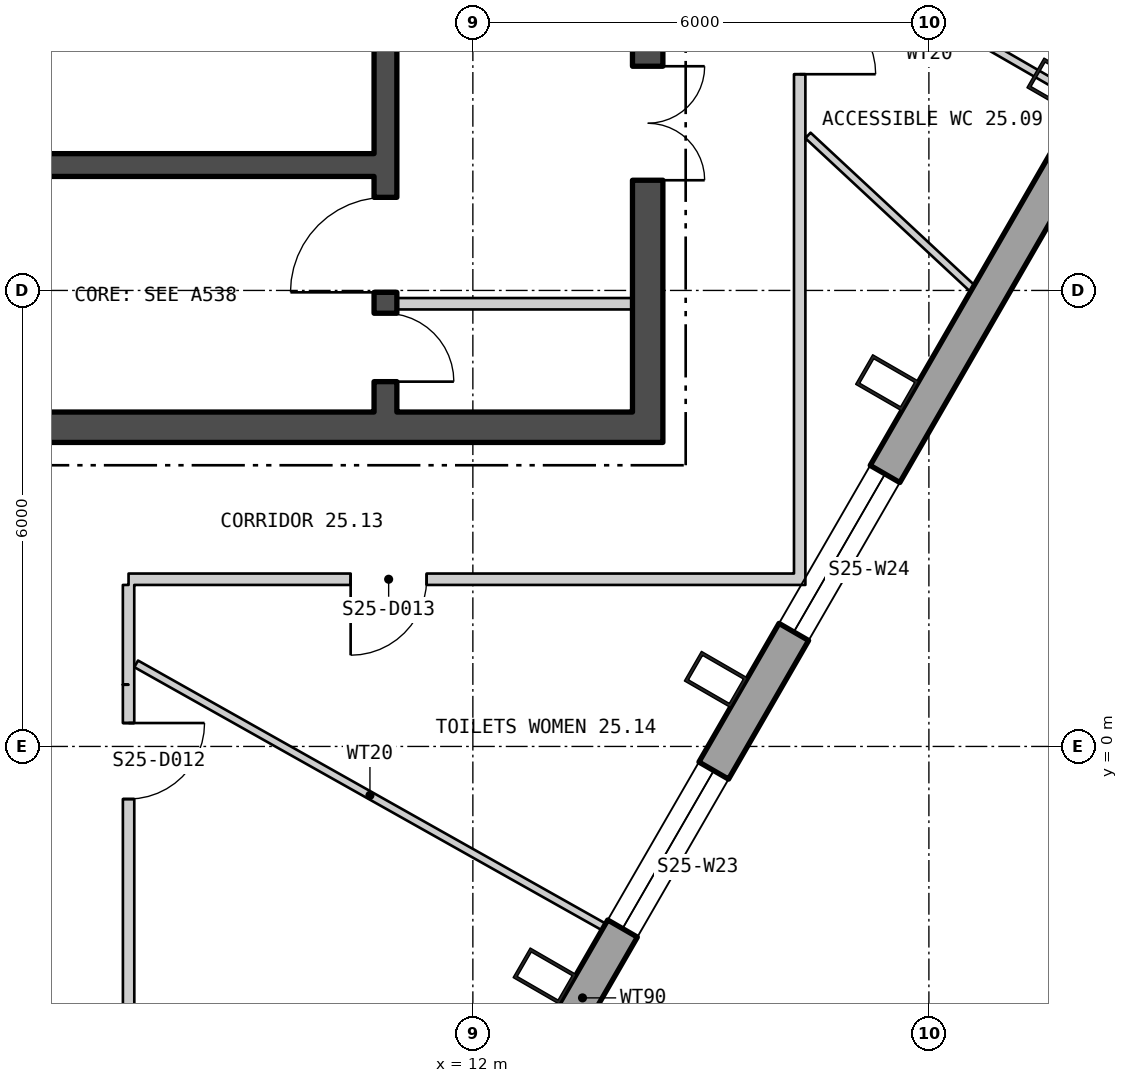
"""IFC4 building model, lengths in metres.
Left out: names, types, materials, properties, quantities, classifications, styles, units other than length and angle.
Written with IfcOpenShell. Run it as: python <this file> out.ifc"""

import sys

from ifc_helpers import new_model, si_unit, direction, frame, frame_2d, origin, origin_2d, place, context, subcontext, project, spatial, polyline, rectangle, hollow_rectangle, outline, extrude, element, fill, save


model = new_model("IFC4")
c1 = context("Model", 3, precision=1e-05, world=origin(), true_north=direction((0.0, 1.0)))
c2 = subcontext(c1, "Body", "Model", "MODEL_VIEW")
j1 = project(units=[si_unit("LENGTHUNIT", "METRE"), si_unit("PLANEANGLEUNIT", "RADIAN")], contexts=[c1])
p1 = place(None, origin())
s1 = spatial("IfcSite", under=j1, at=p1, CompositionType="ELEMENT")
p2 = place(p1, origin())
s2 = spatial("IfcBuilding", under=s1, at=p2, CompositionType="ELEMENT")
p3 = place(p2, frame((0.0, 0.0, 321.0)))
s3 = spatial("IfcBuildingStorey", under=s2, at=p3, CompositionType="ELEMENT", Elevation=321.0)
for number, where, z_axis, x_axis in (
    (1, (12.945, -3.021, 0.0), (0.0, 0.0, 1.0), (0.5, 0.866, 0.0)),
    (2, (15.198, 0.882, 0.0), (0.0, 0.0, 1.0), (0.5, 0.866, 0.0)),
    (3, (17.451, 4.785, 0.0), (0.0, 0.0, 1.0), (0.5, 0.866, 0.0)),
    (4, (19.705, 8.688, 0.0), (0.0, 0.0, 1.0), (0.5, 0.866, 0.0)),
):
    element("IfcColumn", number, at=place(p3, frame(where, z_axis=z_axis, x_axis=x_axis)), inside=s3, PredefinedType="COLUMN", context=c2, shape_type="SweptSolid", body=[
        extrude(hollow_rectangle(XDim=0.45, YDim=0.7, WallThickness=0.04, at=origin_2d()), origin(), (0.0, 0.0, 1.0), 4.2),
    ])
p4 = place(p3, frame((2.01, -23.11, -0.18), z_axis=(0.0, 0.0, 1.0), x_axis=(0.500000141277, 0.866025322218, 0.0)))
e5 = element("IfcWall", 5, at=p4, inside=s3, PredefinedType="SOLIDWALL", context=c2, shape_type="SweptSolid", body=[
    extrude(outline(polyline([(-0.13, -0.225), (45.86, -0.225), (45.6, 0.225), (0.13, 0.225), (-0.13, -0.225)])), origin(), (0.0, 0.0, 1.0), 3.98),
])
p5 = place(p4, frame((1.424, 0.0, 1.08)))
e6 = element("IfcOpeningElement", 6, at=p5, cuts=e5, PredefinedType="OPENING", context=c2, shape_type="SweptSolid", body=[
    extrude(rectangle(XDim=2.4, YDim=2.3, at=frame_2d((1.2, 1.15))), frame((0.0, 0.235, 0.0), z_axis=(0.0, -1.0, 0.0), x_axis=(1.0, 0.0, 0.0)), (0.0, 0.0, 1.0), 0.47),
])
p6 = place(p4, frame((5.892, 0.0, 1.08)))
e7 = element("IfcOpeningElement", 7, at=p6, cuts=e5, PredefinedType="OPENING", context=c2, shape_type="SweptSolid", body=[
    extrude(rectangle(XDim=2.4, YDim=2.3, at=frame_2d((1.2, 1.15))), frame((0.0, 0.235, 0.0), z_axis=(0.0, -1.0, 0.0), x_axis=(1.0, 0.0, 0.0)), (0.0, 0.0, 1.0), 0.47),
])
p7 = place(p4, frame((14.905, 0.0, 1.08)))
e8 = element("IfcOpeningElement", 8, at=p7, cuts=e5, PredefinedType="OPENING", context=c2, shape_type="SweptSolid", body=[
    extrude(rectangle(XDim=2.4, YDim=2.3, at=frame_2d((1.2, 1.15))), frame((0.0, 0.235, 0.0), z_axis=(0.0, -1.0, 0.0), x_axis=(1.0, 0.0, 0.0)), (0.0, 0.0, 1.0), 0.47),
])
p8 = place(p4, frame((19.412, 0.0, 1.08)))
e9 = element("IfcOpeningElement", 9, at=p8, cuts=e5, PredefinedType="OPENING", context=c2, shape_type="SweptSolid", body=[
    extrude(rectangle(XDim=2.4, YDim=2.3, at=frame_2d((1.2, 1.15))), frame((0.0, 0.235, 0.0), z_axis=(0.0, -1.0, 0.0), x_axis=(1.0, 0.0, 0.0)), (0.0, 0.0, 1.0), 0.47),
])
p9 = place(p4, frame((23.918, 0.0, 1.08)))
e10 = element("IfcOpeningElement", 10, at=p9, cuts=e5, PredefinedType="OPENING", context=c2, shape_type="SweptSolid", body=[
    extrude(rectangle(XDim=2.4, YDim=2.3, at=frame_2d((1.2, 1.15))), frame((0.0, 0.235, 0.0), z_axis=(0.0, -1.0, 0.0), x_axis=(1.0, 0.0, 0.0)), (0.0, 0.0, 1.0), 0.47),
])
p10 = place(p4, frame((28.425, 0.0, 1.08)))
e11 = element("IfcOpeningElement", 11, at=p10, cuts=e5, PredefinedType="OPENING", context=c2, shape_type="SweptSolid", body=[
    extrude(rectangle(XDim=2.4, YDim=2.3, at=frame_2d((1.2, 1.15))), frame((0.0, 0.235, 0.0), z_axis=(0.0, -1.0, 0.0), x_axis=(1.0, 0.0, 0.0)), (0.0, 0.0, 1.0), 0.47),
])
p11 = place(p4, frame((37.438, 0.0, 1.08)))
e12 = element("IfcOpeningElement", 12, at=p11, cuts=e5, PredefinedType="OPENING", context=c2, shape_type="SweptSolid", body=[
    extrude(rectangle(XDim=2.4, YDim=2.3, at=frame_2d((1.2, 1.15))), frame((0.0, 0.235, 0.0), z_axis=(0.0, -1.0, 0.0), x_axis=(1.0, 0.0, 0.0)), (0.0, 0.0, 1.0), 0.47),
])
p12 = place(p4, frame((41.907, 0.0, 1.08)))
e13 = element("IfcOpeningElement", 13, at=p12, cuts=e5, PredefinedType="OPENING", context=c2, shape_type="SweptSolid", body=[
    extrude(rectangle(XDim=2.4, YDim=2.3, at=frame_2d((1.2, 1.15))), frame((0.0, 0.235, 0.0), z_axis=(0.0, -1.0, 0.0), x_axis=(1.0, 0.0, 0.0)), (0.0, 0.0, 1.0), 0.47),
])
p13 = place(p3, frame((-14.5, 4.2, 0.0), z_axis=(0.0, 0.0, 1.0), x_axis=(1.0, 0.0, 0.0)))
e14 = element("IfcWall", 14, at=p13, inside=s3, PredefinedType="SHEAR", context=c2, shape_type="SweptSolid", body=[
    extrude(rectangle(XDim=29.0, YDim=0.4, at=frame_2d((14.5, 0.0))), origin(), (0.0, 0.0, 1.0), 4.0),
])
p14 = place(p13, frame((9.0, 0.0, 0.0)))
e15 = element("IfcOpeningElement", 15, at=p14, cuts=e14, PredefinedType="OPENING", context=c2, shape_type="SweptSolid", body=[
    extrude(rectangle(XDim=1.8, YDim=2.4, at=frame_2d((0.9, 1.2))), frame((0.0, 0.21, 0.0), z_axis=(0.0, -1.0, 0.0), x_axis=(1.0, 0.0, 0.0)), (0.0, 0.0, 1.0), 0.42),
])
p15 = place(p13, frame((19.0, 0.0, 0.0)))
e16 = element("IfcOpeningElement", 16, at=p15, cuts=e14, PredefinedType="OPENING", context=c2, shape_type="SweptSolid", body=[
    extrude(rectangle(XDim=1.8, YDim=2.4, at=frame_2d((0.9, 1.2))), frame((0.0, 0.21, 0.0), z_axis=(0.0, -1.0, 0.0), x_axis=(1.0, 0.0, 0.0)), (0.0, 0.0, 1.0), 0.42),
])
p16 = place(p3, frame((14.3, 4.4, 0.0), z_axis=(0.0, 0.0, 1.0), x_axis=(0.0, 1.0, 0.0)))
e17 = element("IfcWall", 17, at=p16, inside=s3, PredefinedType="SHEAR", context=c2, shape_type="SweptSolid", body=[
    extrude(rectangle(XDim=13.2, YDim=0.4, at=frame_2d((6.6, 0.0))), origin(), (0.0, 0.0, 1.0), 4.0),
])
p17 = place(p16, frame((3.05, 0.0, 0.0)))
e18 = element("IfcOpeningElement", 18, at=p17, cuts=e17, PredefinedType="OPENING", context=c2, shape_type="SweptSolid", body=[
    extrude(rectangle(XDim=1.5, YDim=2.1, at=frame_2d((0.75, 1.05))), frame((0.0, 0.21, 0.0), z_axis=(0.0, -1.0, 0.0), x_axis=(1.0, 0.0, 0.0)), (0.0, 0.0, 1.0), 0.42),
])
p18 = place(p3, frame((10.85, 4.4, 0.0), z_axis=(0.0, 0.0, 1.0), x_axis=(0.0, 1.0, 0.0)))
e19 = element("IfcWall", 19, at=p18, inside=s3, PredefinedType="SHEAR", context=c2, shape_type="SweptSolid", body=[
    extrude(rectangle(XDim=13.2, YDim=0.3, at=frame_2d((6.6, 0.0))), origin(), (0.0, 0.0, 1.0), 4.0),
])
p19 = place(p18, frame((1.575, 0.0, 0.0)))
e20 = element("IfcOpeningElement", 20, at=p19, cuts=e19, PredefinedType="OPENING", context=c2, shape_type="SweptSolid", body=[
    extrude(rectangle(XDim=1.25, YDim=2.1, at=frame_2d((0.625, 1.05))), frame((0.0, 0.16, 0.0), z_axis=(0.0, -1.0, 0.0), x_axis=(1.0, 0.0, 0.0)), (0.0, 0.0, 1.0), 0.32),
])
p20 = place(p18, frame((0.4, 0.0, 0.0)))
e21 = element("IfcOpeningElement", 21, at=p20, cuts=e19, PredefinedType="OPENING", context=c2, shape_type="SweptSolid", body=[
    extrude(rectangle(XDim=0.9, YDim=2.1, at=frame_2d((0.45, 1.05))), frame((0.0, 0.16, 0.0), z_axis=(0.0, -1.0, 0.0), x_axis=(1.0, 0.0, 0.0)), (0.0, 0.0, 1.0), 0.32),
])
p21 = place(p3, frame((2.6, 7.65, 0.0), z_axis=(0.0, 0.0, 1.0), x_axis=(1.0, 0.0, 0.0)))
e22 = element("IfcWall", 22, at=p21, inside=s3, PredefinedType="SHEAR", context=c2, shape_type="SweptSolid", body=[
    extrude(rectangle(XDim=8.1, YDim=0.3, at=frame_2d((4.05, 0.0))), origin(), (0.0, 0.0, 1.0), 4.0),
])
p22 = place(p3, frame((11.0, 5.825, 0.0), z_axis=(0.0, 0.0, 1.0), x_axis=(1.0, 0.0, 0.0)))
e23 = element("IfcWall", 23, at=p22, inside=s3, PredefinedType="PARTITIONING", context=c2, shape_type="SweptSolid", body=[
    extrude(rectangle(XDim=3.1, YDim=0.15, at=frame_2d((1.55, 0.0))), origin(), (0.0, 0.0, 1.0), 4.0),
])
p23 = place(p3, frame((7.47, 0.812, 0.0), z_axis=(0.0, 0.0, 1.0), x_axis=(0.000170502981, -0.999999985464, 0.0)))
e24 = element("IfcWall", 24, at=p23, inside=s3, PredefinedType="PARTITIONING", context=c2, shape_type="SweptSolid", body=[
    extrude(rectangle(XDim=5.865, YDim=0.15, at=frame_2d((2.933, 0.0))), origin(), (0.0, 0.0, 1.0), 4.0),
])
p24 = place(p23, frame((0.504, 0.0, 0.0)))
e25 = element("IfcOpeningElement", 25, at=p24, cuts=e24, PredefinedType="OPENING", context=c2, shape_type="SweptSolid", body=[
    extrude(rectangle(XDim=1.0, YDim=2.1, at=frame_2d((0.5, 1.05))), frame((0.0, 0.085, 0.0), z_axis=(0.0, -1.0, 0.0), x_axis=(1.0, 0.0, 0.0)), (0.0, 0.0, 1.0), 0.17),
])
p25 = place(p3, frame((7.47, 0.812, 0.0), z_axis=(0.0, 0.0, 1.0), x_axis=(0.0, 1.0, 0.0)))
e26 = element("IfcWall", 26, at=p25, inside=s3, PredefinedType="PARTITIONING", context=c2, shape_type="SweptSolid", body=[
    extrude(rectangle(XDim=1.313, YDim=0.15, at=frame_2d((0.656, 0.0))), origin(), (0.0, 0.0, 1.0), 4.0),
])
p26 = place(p3, frame((7.47, 2.2, 0.0), z_axis=(0.0, 0.0, 1.0), x_axis=(1.0, 0.0, 0.0)))
e27 = element("IfcWall", 27, at=p26, inside=s3, PredefinedType="PARTITIONING", context=c2, shape_type="SweptSolid", body=[
    extrude(rectangle(XDim=8.755, YDim=0.15, at=frame_2d((4.378, 0.0))), origin(), (0.0, 0.0, 1.0), 4.0),
])
p27 = place(p26, frame((2.922, 0.0, 0.0)))
e28 = element("IfcOpeningElement", 28, at=p27, cuts=e27, PredefinedType="OPENING", context=c2, shape_type="SweptSolid", body=[
    extrude(rectangle(XDim=1.0, YDim=2.1, at=frame_2d((0.5, 1.05))), frame((0.0, 0.085, 0.0), z_axis=(0.0, -1.0, 0.0), x_axis=(1.0, 0.0, 0.0)), (0.0, 0.0, 1.0), 0.17),
])
p28 = place(p3, frame((7.57, 1.087, 0.0), z_axis=(0.0, 0.0, 1.0), x_axis=(0.871545267987, -0.490315047546, 0.0)))
e29 = element("IfcWall", 29, at=p28, inside=s3, PredefinedType="PARTITIONING", context=c2, shape_type="SweptSolid", body=[
    extrude(rectangle(XDim=7.059, YDim=0.1, at=frame_2d((3.529, 0.0))), origin(), (0.0, 0.0, 1.0), 4.0),
])
p29 = place(p3, frame((16.3, 2.125, 0.0), z_axis=(0.0, 0.0, 1.0), x_axis=(0.0, 1.0, 0.0)))
e30 = element("IfcWall", 30, at=p29, inside=s3, PredefinedType="PARTITIONING", context=c2, shape_type="SweptSolid", body=[
    extrude(rectangle(XDim=17.623, YDim=0.15, at=frame_2d((8.812, 0.0))), origin(), (0.0, 0.0, 1.0), 4.0),
])
p30 = place(p29, frame((6.72, 0.0, 0.0)))
e31 = element("IfcOpeningElement", 31, at=p30, cuts=e30, PredefinedType="OPENING", context=c2, shape_type="SweptSolid", body=[
    extrude(rectangle(XDim=1.0, YDim=2.1, at=frame_2d((0.5, 1.05))), frame((0.0, 0.085, 0.0), z_axis=(0.0, -1.0, 0.0), x_axis=(1.0, 0.0, 0.0)), (0.0, 0.0, 1.0), 0.17),
])
p31 = place(p29, frame((9.633, 0.0, 0.0)))
e32 = element("IfcOpeningElement", 32, at=p31, cuts=e30, PredefinedType="OPENING", context=c2, shape_type="SweptSolid", body=[
    extrude(rectangle(XDim=1.0, YDim=2.1, at=frame_2d((0.5, 1.05))), frame((0.0, 0.085, 0.0), z_axis=(0.0, -1.0, 0.0), x_axis=(1.0, 0.0, 0.0)), (0.0, 0.0, 1.0), 0.17),
])
p32 = place(p29, frame((12.544, 0.0, 0.0)))
e33 = element("IfcOpeningElement", 33, at=p32, cuts=e30, PredefinedType="OPENING", context=c2, shape_type="SweptSolid", body=[
    extrude(rectangle(XDim=1.0, YDim=2.1, at=frame_2d((0.5, 1.05))), frame((0.0, 0.085, 0.0), z_axis=(0.0, -1.0, 0.0), x_axis=(1.0, 0.0, 0.0)), (0.0, 0.0, 1.0), 0.17),
])
p33 = place(p3, frame((16.4, 10.595, 0.0), z_axis=(0.0, 0.0, 1.0), x_axis=(0.866131810338, -0.499815653138, 0.0)))
e34 = element("IfcWall", 34, at=p33, inside=s3, PredefinedType="PARTITIONING", context=c2, shape_type="SweptSolid", body=[
    extrude(rectangle(XDim=3.715, YDim=0.1, at=frame_2d((1.858, 0.0))), origin(), (0.0, 0.0, 1.0), 4.0),
])
p34 = place(p3, frame((16.409, 8.039, 0.0), z_axis=(0.0, 0.0, 1.0), x_axis=(0.732202441649, -0.68108706084, 0.0)))
e35 = element("IfcWall", 35, at=p34, inside=s3, PredefinedType="PARTITIONING", context=c2, shape_type="SweptSolid", body=[
    extrude(rectangle(XDim=2.954, YDim=0.1, at=frame_2d((1.477, 0.0))), origin(), (0.0, 0.0, 1.0), 4.0),
])
p35 = place(p9, origin())
e36 = element("IfcWindow", 36, at=p35, inside=s3, PartitioningType="SINGLE_PANEL", PredefinedType="WINDOW", context=c2, shape_type="SweptSolid", body=[
    extrude(rectangle(XDim=2.4, YDim=2.3, at=frame_2d((1.2, 1.15))), frame((0.0, 0.105, 0.0), z_axis=(0.0, -1.0, 0.0), x_axis=(1.0, 0.0, 0.0)), (0.0, 0.0, 1.0), 0.06),
])
fill(e10, e36)
p36 = place(p10, origin())
e37 = element("IfcWindow", 37, at=p36, inside=s3, PartitioningType="SINGLE_PANEL", PredefinedType="WINDOW", context=c2, shape_type="SweptSolid", body=[
    extrude(rectangle(XDim=2.4, YDim=2.3, at=frame_2d((1.2, 1.15))), frame((0.0, 0.105, 0.0), z_axis=(0.0, -1.0, 0.0), x_axis=(1.0, 0.0, 0.0)), (0.0, 0.0, 1.0), 0.06),
])
fill(e11, e37)
p37 = place(p19, origin())
e38 = element("IfcDoor", 38, at=p37, inside=s3, OperationType="SINGLE_SWING_RIGHT", PredefinedType="DOOR", context=c2, shape_type="SweptSolid", body=[
    extrude(rectangle(XDim=1.25, YDim=2.1, at=frame_2d((0.625, 1.05))), frame((0.0, 0.025, 0.0), z_axis=(0.0, -1.0, 0.0), x_axis=(1.0, 0.0, 0.0)), (0.0, 0.0, 1.0), 0.05),
])
fill(e20, e38)
p38 = place(p17, origin())
e39 = element("IfcDoor", 39, at=p38, inside=s3, OperationType="DOUBLE_DOOR_SINGLE_SWING", PredefinedType="DOOR", context=c2, shape_type="SweptSolid", body=[
    extrude(rectangle(XDim=1.5, YDim=2.1, at=frame_2d((0.75, 1.05))), frame((0.0, 0.025, 0.0), z_axis=(0.0, -1.0, 0.0), x_axis=(1.0, 0.0, 0.0)), (0.0, 0.0, 1.0), 0.05),
])
fill(e18, e39)
p39 = place(p20, origin())
e40 = element("IfcDoor", 40, at=p39, inside=s3, OperationType="SINGLE_SWING_LEFT", PredefinedType="DOOR", context=c2, shape_type="SweptSolid", body=[
    extrude(rectangle(XDim=0.9, YDim=2.1, at=frame_2d((0.45, 1.05))), frame((0.0, 0.025, 0.0), z_axis=(0.0, -1.0, 0.0), x_axis=(1.0, 0.0, 0.0)), (0.0, 0.0, 1.0), 0.05),
])
fill(e21, e40)
p40 = place(p24, origin())
e41 = element("IfcDoor", 41, at=p40, inside=s3, OperationType="SINGLE_SWING_RIGHT", PredefinedType="DOOR", context=c2, shape_type="SweptSolid", body=[
    extrude(rectangle(XDim=1.0, YDim=2.1, at=frame_2d((0.5, 1.05))), frame((0.0, 0.025, 0.0), z_axis=(0.0, -1.0, 0.0), x_axis=(1.0, 0.0, 0.0)), (0.0, 0.0, 1.0), 0.05),
])
fill(e25, e41)
p41 = place(p27, origin())
e42 = element("IfcDoor", 42, at=p41, inside=s3, OperationType="SINGLE_SWING_LEFT", PredefinedType="DOOR", context=c2, shape_type="SweptSolid", body=[
    extrude(rectangle(XDim=1.0, YDim=2.1, at=frame_2d((0.5, 1.05))), frame((0.0, 0.025, 0.0), z_axis=(0.0, -1.0, 0.0), x_axis=(1.0, 0.0, 0.0)), (0.0, 0.0, 1.0), 0.05),
])
fill(e28, e42)
p42 = place(p30, origin())
e43 = element("IfcDoor", 43, at=p42, inside=s3, OperationType="SINGLE_SWING_LEFT", PredefinedType="DOOR", context=c2, shape_type="SweptSolid", body=[
    extrude(rectangle(XDim=1.0, YDim=2.1, at=frame_2d((0.5, 1.05))), frame((0.0, 0.025, 0.0), z_axis=(0.0, -1.0, 0.0), x_axis=(1.0, 0.0, 0.0)), (0.0, 0.0, 1.0), 0.05),
])
fill(e31, e43)
save(model, sys.argv[1])
